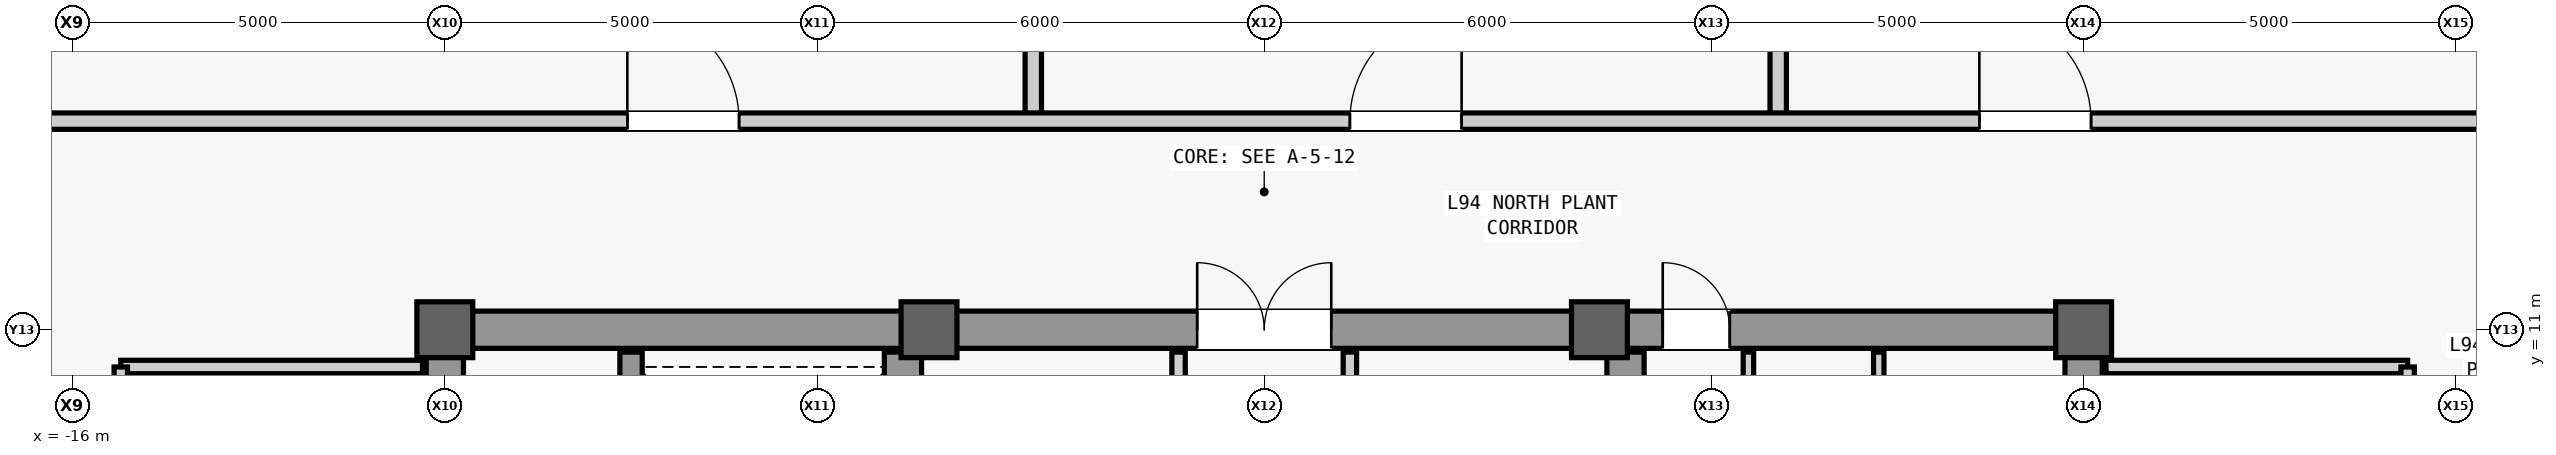
"""IFC4 building model, lengths in metres.
Left out: names, types, materials, properties, quantities, classifications, styles, units other than length and angle.
Written with IfcOpenShell. Run it as: python <this file> out.ifc"""

import sys

from ifc_helpers import new_model, si_unit, direction, frame, frame_2d, origin, origin_2d, place, context, subcontext, project, spatial, rectangle, extrude, source, transform, mapped, element, fill, save


model = new_model("IFC4")
c1 = context("Model", 3, precision=1e-05, world=origin(), true_north=direction((0.0, 1.0)))
c2 = subcontext(c1, "Body", "Model", "MODEL_VIEW")
j1 = project(units=[si_unit("LENGTHUNIT", "METRE"), si_unit("PLANEANGLEUNIT", "RADIAN")], contexts=[c1])
p1 = place(None, origin())
s1 = spatial("IfcSite", under=j1, at=p1, CompositionType="ELEMENT")
p2 = place(p1, origin())
s2 = spatial("IfcBuilding", under=s1, at=p2, CompositionType="ELEMENT")
p3 = place(p2, frame((0.0, 0.0, 399.5)))
s3 = spatial("IfcBuildingStorey", under=s2, at=p3, CompositionType="ELEMENT", Elevation=399.5)
m1 = source(origin(), c2, "Body", "SweptSolid", [
    extrude(rectangle(XDim=22.0, YDim=0.5, at=frame_2d((11.0, 0.0))), origin(), (0.0, 0.0, 1.0), 4.5),
])
p4 = place(p3, frame((-11.0, -11.0, 0.0), z_axis=(0.0, 0.0, 1.0), x_axis=(0.0, 1.0, 0.0)))
e1 = element("IfcWall", 1, at=p4, inside=s3, PredefinedType="SHEAR", context=c2, shape_type="MappedRepresentation", body=[
    mapped(m1, transform((0.0, 0.0, 0.0), scale=1.0)),
])
m2 = source(origin(), c2, "Body", "SweptSolid", [
    extrude(rectangle(XDim=1.1, YDim=2.2, at=frame_2d((0.55, 1.1))), frame((0.0, 0.26, 0.0), z_axis=(0.0, -1.0, 0.0), x_axis=(1.0, 0.0, 0.0)), (0.0, 0.0, 1.0), 0.52),
])
p5 = place(p4, frame((0.8, 0.0, 0.0)))
e2 = element("IfcOpeningElement", 2, at=p5, cuts=e1, PredefinedType="OPENING", context=c2, shape_type="MappedRepresentation", body=[
    mapped(m2, transform((0.0, 0.0, 0.0), scale=1.0)),
])
p6 = place(p4, frame((12.5, 0.0, 0.0)))
e3 = element("IfcOpeningElement", 3, at=p6, cuts=e1, PredefinedType="OPENING", context=c2, shape_type="MappedRepresentation", body=[
    mapped(m2, transform((0.0, 0.0, 0.0), scale=1.0)),
])
m3 = source(origin(), c2, "Body", "SweptSolid", [
    extrude(rectangle(XDim=0.9, YDim=2.15, at=frame_2d((0.45, 1.075))), frame((0.0, 0.26, 0.0), z_axis=(0.0, -1.0, 0.0), x_axis=(1.0, 0.0, 0.0)), (0.0, 0.0, 1.0), 0.52),
])
p7 = place(p4, frame((7.575, 0.0, 0.0)))
e4 = element("IfcOpeningElement", 4, at=p7, cuts=e1, PredefinedType="OPENING", context=c2, shape_type="MappedRepresentation", body=[
    mapped(m3, transform((0.0, 0.0, 0.0), scale=1.0)),
])
m4 = source(origin(), c2, "Body", "SweptSolid", [
    extrude(rectangle(XDim=1.3, YDim=2.3, at=frame_2d((0.65, 1.15))), frame((0.0, 0.26, 0.0), z_axis=(0.0, -1.0, 0.0), x_axis=(1.0, 0.0, 0.0)), (0.0, 0.0, 1.0), 0.52),
])
p8 = place(p4, frame((2.7, 0.0, 0.0)))
e5 = element("IfcOpeningElement", 5, at=p8, cuts=e1, PredefinedType="OPENING", context=c2, shape_type="MappedRepresentation", body=[
    mapped(m4, transform((0.0, 0.0, 0.0), scale=1.0)),
])
p9 = place(p3, frame((11.0, -11.0, 0.0), z_axis=(0.0, 0.0, 1.0), x_axis=(0.0, 1.0, 0.0)))
e6 = element("IfcWall", 6, at=p9, inside=s3, PredefinedType="SHEAR", context=c2, shape_type="MappedRepresentation", body=[
    mapped(m1, transform((0.0, 0.0, 0.0), scale=1.0)),
])
p10 = place(p9, frame((0.8, 0.0, 0.0)))
e7 = element("IfcOpeningElement", 7, at=p10, cuts=e6, PredefinedType="OPENING", context=c2, shape_type="MappedRepresentation", body=[
    mapped(m2, transform((0.0, 0.0, 0.0), scale=1.0)),
])
p11 = place(p9, frame((7.575, 0.0, 0.0)))
e8 = element("IfcOpeningElement", 8, at=p11, cuts=e6, PredefinedType="OPENING", context=c2, shape_type="MappedRepresentation", body=[
    mapped(m3, transform((0.0, 0.0, 0.0), scale=1.0)),
])
p12 = place(p9, frame((2.7, 0.0, 0.0)))
e9 = element("IfcOpeningElement", 9, at=p12, cuts=e6, PredefinedType="OPENING", context=c2, shape_type="MappedRepresentation", body=[
    mapped(m4, transform((0.0, 0.0, 0.0), scale=1.0)),
])
p13 = place(p9, frame((13.35, 0.0, 0.0)))
e10 = element("IfcOpeningElement", 10, at=p13, cuts=e6, PredefinedType="OPENING", context=c2, shape_type="MappedRepresentation", body=[
    mapped(m4, transform((0.0, 0.0, 0.0), scale=1.0)),
])
m5 = source(origin(), c2, "Body", "SweptSolid", [
    extrude(rectangle(XDim=21.4, YDim=0.5, at=frame_2d((10.7, 0.0))), origin(), (0.0, 0.0, 1.0), 4.5),
])
for number, where, z_axis, x_axis in (
    (11, (-4.85, -10.7, 0.0), (0.0, 0.0, 1.0), (0.0, 1.0, 0.0)),
    (12, (4.85, -10.7, 0.0), (0.0, 0.0, 1.0), (0.0, 1.0, 0.0)),
):
    element("IfcWall", number, at=place(p3, frame(where, z_axis=z_axis, x_axis=x_axis)), inside=s3, PredefinedType="SHEAR", context=c2, shape_type="MappedRepresentation", body=[
        mapped(m5, transform((0.0, 0.0, 0.0), scale=1.0)),
    ])
m6 = source(origin(), c2, "Body", "SweptSolid", [
    extrude(rectangle(XDim=5.9, YDim=0.5, at=frame_2d((2.95, 0.0))), origin(), (0.0, 0.0, 1.0), 4.5),
])
p14 = place(p3, frame((-10.75, 11.0, 0.0), z_axis=(0.0, 0.0, 1.0), x_axis=(1.0, 0.0, 0.0)))
e13 = element("IfcWall", 13, at=p14, inside=s3, PredefinedType="SHEAR", context=c2, shape_type="MappedRepresentation", body=[
    mapped(m6, transform((0.0, 0.0, 0.0), scale=1.0)),
])
p15 = place(p3, frame((4.85, 11.0, 0.0), z_axis=(0.0, 0.0, 1.0), x_axis=(1.0, 0.0, 0.0)))
e14 = element("IfcWall", 14, at=p15, inside=s3, PredefinedType="SHEAR", context=c2, shape_type="MappedRepresentation", body=[
    mapped(m6, transform((0.0, 0.0, 0.0), scale=1.0)),
])
p16 = place(p15, frame((0.5, 0.0, 0.0)))
e15 = element("IfcOpeningElement", 15, at=p16, cuts=e14, PredefinedType="OPENING", context=c2, shape_type="MappedRepresentation", body=[
    mapped(m3, transform((0.0, 0.0, 0.0), scale=1.0)),
])
m7 = source(origin(), c2, "Body", "SweptSolid", [
    extrude(rectangle(XDim=9.2, YDim=0.5, at=frame_2d((4.6, 0.0))), origin(), (0.0, 0.0, 1.0), 4.5),
])
p17 = place(p3, frame((-4.6, 11.0, 0.0), z_axis=(0.0, 0.0, 1.0), x_axis=(1.0, 0.0, 0.0)))
e16 = element("IfcWall", 16, at=p17, inside=s3, PredefinedType="SHEAR", context=c2, shape_type="MappedRepresentation", body=[
    mapped(m7, transform((0.0, 0.0, 0.0), scale=1.0)),
])
m8 = source(origin(), c2, "Body", "SweptSolid", [
    extrude(rectangle(XDim=1.8, YDim=2.25, at=frame_2d((0.9, 1.125))), frame((0.0, 0.26, 0.0), z_axis=(0.0, -1.0, 0.0), x_axis=(1.0, 0.0, 0.0)), (0.0, 0.0, 1.0), 0.52),
])
p18 = place(p17, frame((3.7, 0.0, 0.0)))
e17 = element("IfcOpeningElement", 17, at=p18, cuts=e16, PredefinedType="OPENING", context=c2, shape_type="MappedRepresentation", body=[
    mapped(m8, transform((0.0, 0.0, 0.0), scale=1.0)),
])
m9 = source(origin(), c2, "Body", "SweptSolid", [
    extrude(rectangle(XDim=0.75, YDim=0.75, at=origin_2d()), origin(), (0.0, 0.0, 1.0), 4.8),
])
for number, where, z_axis, x_axis in (
    (18, (-11.0, 11.0, 0.0), (0.0, 0.0, 1.0), (1.0, 0.0, 0.0)),
    (19, (-4.5, 11.0, 0.0), (0.0, 0.0, 1.0), (1.0, 0.0, 0.0)),
    (20, (4.5, 11.0, 0.0), (0.0, 0.0, 1.0), (1.0, 0.0, 0.0)),
    (21, (11.0, 11.0, 0.0), (0.0, 0.0, 1.0), (1.0, 0.0, 0.0)),
):
    element("IfcColumn", number, at=place(p3, frame(where, z_axis=z_axis, x_axis=x_axis)), inside=s3, PredefinedType="COLUMN", context=c2, shape_type="MappedRepresentation", body=[
        mapped(m9, transform((0.0, 0.0, 0.0), scale=1.0)),
    ])
m10 = source(origin(), c2, "Body", "SweptSolid", [
    extrude(rectangle(XDim=7.75, YDim=0.3, at=frame_2d((3.875, 0.0))), origin(), (0.0, 0.0, 1.0), 4.5),
])
p19 = place(p3, frame((-8.5, 2.95, 0.0), z_axis=(0.0, 0.0, 1.0), x_axis=(0.0, 1.0, 0.0)))
e22 = element("IfcWall", 22, at=p19, inside=s3, PredefinedType="SHEAR", context=c2, shape_type="MappedRepresentation", body=[
    mapped(m10, transform((0.0, 0.0, 0.0), scale=1.0)),
])
m11 = source(origin(), c2, "Body", "SweptSolid", [
    extrude(rectangle(XDim=9.4, YDim=0.14, at=frame_2d((4.7, 0.0))), origin(), (0.0, 0.0, 1.0), 4.5),
])
p20 = place(p3, frame((8.25, 1.3, 0.0), z_axis=(0.0, 0.0, 1.0), x_axis=(0.0, 1.0, 0.0)))
e23 = element("IfcWall", 23, at=p20, inside=s3, PredefinedType="PARTITIONING", context=c2, shape_type="MappedRepresentation", body=[
    mapped(m11, transform((0.0, 0.0, 0.0), scale=1.0)),
])
m12 = source(origin(), c2, "Body", "SweptSolid", [
    extrude(rectangle(XDim=5.7, YDim=0.14, at=frame_2d((2.85, 0.0))), origin(), (0.0, 0.0, 1.0), 4.5),
])
p21 = place(p3, frame((6.5, 5.0, 0.0), z_axis=(0.0, 0.0, 1.0), x_axis=(0.0, 1.0, 0.0)))
e24 = element("IfcWall", 24, at=p21, inside=s3, PredefinedType="PARTITIONING", context=c2, shape_type="MappedRepresentation", body=[
    mapped(m12, transform((0.0, 0.0, 0.0), scale=1.0)),
])
m13 = source(origin(), c2, "Body", "SweptSolid", [
    extrude(rectangle(XDim=0.9, YDim=2.15, at=frame_2d((0.45, 1.075))), frame((0.0, 0.08, 0.0), z_axis=(0.0, -1.0, 0.0), x_axis=(1.0, 0.0, 0.0)), (0.0, 0.0, 1.0), 0.16),
])
p22 = place(p21, frame((2.05, 0.0, 0.0)))
e25 = element("IfcOpeningElement", 25, at=p22, cuts=e24, PredefinedType="OPENING", context=c2, shape_type="MappedRepresentation", body=[
    mapped(m13, transform((0.0, 0.0, 0.0), scale=1.0)),
])
m14 = source(origin(), c2, "Body", "SweptSolid", [
    extrude(rectangle(XDim=4.05, YDim=0.18, at=frame_2d((2.025, 0.0))), origin(), (0.0, 0.0, 1.0), 4.5),
])
p23 = place(p3, frame((-15.35, 10.5, 0.0), z_axis=(0.0, 0.0, 1.0), x_axis=(1.0, 0.0, 0.0)))
e26 = element("IfcWall", 26, at=p23, inside=s3, PredefinedType="PARTITIONING", context=c2, shape_type="MappedRepresentation", body=[
    mapped(m14, transform((0.0, 0.0, 0.0), scale=1.0)),
])
m15 = source(origin(), c2, "Body", "SweptSolid", [
    extrude(rectangle(XDim=16.6, YDim=0.18, at=frame_2d((8.3, 0.0))), origin(), (0.0, 0.0, 1.0), 4.5),
])
p24 = place(p3, frame((-15.35, -6.1, 0.0), z_axis=(0.0, 0.0, 1.0), x_axis=(0.0, 1.0, 0.0)))
e27 = element("IfcWall", 27, at=p24, inside=s3, PredefinedType="PARTITIONING", context=c2, shape_type="MappedRepresentation", body=[
    mapped(m15, transform((0.0, 0.0, 0.0), scale=1.0)),
])
m16 = source(origin(), c2, "Body", "SweptSolid", [
    extrude(rectangle(XDim=1.8, YDim=2.25, at=frame_2d((0.9, 1.125))), frame((0.0, 0.1, 0.0), z_axis=(0.0, -1.0, 0.0), x_axis=(1.0, 0.0, 0.0)), (0.0, 0.0, 1.0), 0.2),
])
p25 = place(p24, frame((2.7, 0.0, 0.0)))
e28 = element("IfcOpeningElement", 28, at=p25, cuts=e27, PredefinedType="OPENING", context=c2, shape_type="MappedRepresentation", body=[
    mapped(m16, transform((0.0, 0.0, 0.0), scale=1.0)),
])
p26 = place(p24, frame((11.0, 0.0, 0.0)))
e29 = element("IfcOpeningElement", 29, at=p26, cuts=e27, PredefinedType="OPENING", context=c2, shape_type="MappedRepresentation", body=[
    mapped(m16, transform((0.0, 0.0, 0.0), scale=1.0)),
])
p27 = place(p3, frame((11.3, 10.5, 0.0), z_axis=(0.0, 0.0, 1.0), x_axis=(1.0, 0.0, 0.0)))
e30 = element("IfcWall", 30, at=p27, inside=s3, PredefinedType="PARTITIONING", context=c2, shape_type="MappedRepresentation", body=[
    mapped(m14, transform((0.0, 0.0, 0.0), scale=1.0)),
])
p28 = place(p3, frame((15.35, -6.1, 0.0), z_axis=(0.0, 0.0, 1.0), x_axis=(0.0, 1.0, 0.0)))
e31 = element("IfcWall", 31, at=p28, inside=s3, PredefinedType="PARTITIONING", context=c2, shape_type="MappedRepresentation", body=[
    mapped(m15, transform((0.0, 0.0, 0.0), scale=1.0)),
])
p29 = place(p28, frame((2.7, 0.0, 0.0)))
e32 = element("IfcOpeningElement", 32, at=p29, cuts=e31, PredefinedType="OPENING", context=c2, shape_type="MappedRepresentation", body=[
    mapped(m16, transform((0.0, 0.0, 0.0), scale=1.0)),
])
p30 = place(p28, frame((13.0, 0.0, 0.0)))
e33 = element("IfcOpeningElement", 33, at=p30, cuts=e31, PredefinedType="OPENING", context=c2, shape_type="MappedRepresentation", body=[
    mapped(m16, transform((0.0, 0.0, 0.0), scale=1.0)),
])
m17 = source(origin(), c2, "Body", "SweptSolid", [
    extrude(rectangle(XDim=5.4, YDim=0.18, at=frame_2d((2.7, 0.0))), origin(), (0.0, 0.0, 1.0), 4.5),
])
p31 = place(p3, frame((-1.15, 5.3, 0.0), z_axis=(0.0, 0.0, 1.0), x_axis=(0.0, 1.0, 0.0)))
e34 = element("IfcWall", 34, at=p31, inside=s3, PredefinedType="PARTITIONING", context=c2, shape_type="MappedRepresentation", body=[
    mapped(m17, transform((0.0, 0.0, 0.0), scale=1.0)),
])
m18 = source(origin(), c2, "Body", "SweptSolid", [
    extrude(rectangle(XDim=0.9, YDim=2.15, at=frame_2d((0.45, 1.075))), frame((0.0, 0.1, 0.0), z_axis=(0.0, -1.0, 0.0), x_axis=(1.0, 0.0, 0.0)), (0.0, 0.0, 1.0), 0.2),
])
p32 = place(p31, frame((0.7, 0.0, 0.0)))
e35 = element("IfcOpeningElement", 35, at=p32, cuts=e34, PredefinedType="OPENING", context=c2, shape_type="MappedRepresentation", body=[
    mapped(m18, transform((0.0, 0.0, 0.0), scale=1.0)),
])
p33 = place(p31, frame((3.4, 0.0, 0.0)))
e36 = element("IfcOpeningElement", 36, at=p33, cuts=e34, PredefinedType="OPENING", context=c2, shape_type="MappedRepresentation", body=[
    mapped(m18, transform((0.0, 0.0, 0.0), scale=1.0)),
])
p34 = place(p3, frame((1.15, 5.3, 0.0), z_axis=(0.0, 0.0, 1.0), x_axis=(0.0, 1.0, 0.0)))
e37 = element("IfcWall", 37, at=p34, inside=s3, PredefinedType="PARTITIONING", context=c2, shape_type="MappedRepresentation", body=[
    mapped(m17, transform((0.0, 0.0, 0.0), scale=1.0)),
])
p35 = place(p34, frame((0.45, 0.0, 0.0)))
e38 = element("IfcOpeningElement", 38, at=p35, cuts=e37, PredefinedType="OPENING", context=c2, shape_type="MappedRepresentation", body=[
    mapped(m18, transform((0.0, 0.0, 0.0), scale=1.0)),
])
p36 = place(p34, frame((2.25, 0.0, 0.0)))
e39 = element("IfcOpeningElement", 39, at=p36, cuts=e37, PredefinedType="OPENING", context=c2, shape_type="MappedRepresentation", body=[
    mapped(m18, transform((0.0, 0.0, 0.0), scale=1.0)),
])
p37 = place(p34, frame((4.05, 0.0, 0.0)))
e40 = element("IfcOpeningElement", 40, at=p37, cuts=e37, PredefinedType="OPENING", context=c2, shape_type="MappedRepresentation", body=[
    mapped(m18, transform((0.0, 0.0, 0.0), scale=1.0)),
])
m19 = source(origin(), c2, "Body", "SweptSolid", [
    extrude(rectangle(XDim=10.2, YDim=0.22, at=frame_2d((5.1, 0.0))), origin(), (0.0, 0.0, 1.0), 4.5),
])
for number, where, z_axis, x_axis in (
    (41, (-3.1, 13.8, 0.0), (0.0, 0.0, 1.0), (0.0, 1.0, 0.0)),
    (42, (6.9, 13.8, 0.0), (0.0, 0.0, 1.0), (0.0, 1.0, 0.0)),
):
    element("IfcWall", number, at=place(p3, frame(where, z_axis=z_axis, x_axis=x_axis)), inside=s3, PredefinedType="PARTITIONING", context=c2, shape_type="MappedRepresentation", body=[
        mapped(m19, transform((0.0, 0.0, 0.0), scale=1.0)),
    ])
m20 = source(origin(), c2, "Body", "SweptSolid", [
    extrude(rectangle(XDim=36.0, YDim=0.22, at=frame_2d((18.0, 0.0))), origin(), (0.0, 0.0, 1.0), 4.5),
])
p38 = place(p3, frame((-18.0, 13.8, 0.0), z_axis=(0.0, 0.0, 1.0), x_axis=(1.0, 0.0, 0.0)))
e43 = element("IfcWall", 43, at=p38, inside=s3, PredefinedType="PARTITIONING", context=c2, shape_type="MappedRepresentation", body=[
    mapped(m20, transform((0.0, 0.0, 0.0), scale=1.0)),
])
m21 = source(origin(), c2, "Body", "SweptSolid", [
    extrude(rectangle(XDim=1.5, YDim=2.3, at=frame_2d((0.75, 1.15))), frame((0.0, 0.12, 0.0), z_axis=(0.0, -1.0, 0.0), x_axis=(1.0, 0.0, 0.0)), (0.0, 0.0, 1.0), 0.24),
])
p39 = place(p38, frame((9.45, 0.0, 0.0)))
e44 = element("IfcOpeningElement", 44, at=p39, cuts=e43, PredefinedType="OPENING", context=c2, shape_type="MappedRepresentation", body=[
    mapped(m21, transform((0.0, 0.0, 0.0), scale=1.0)),
])
p40 = place(p38, frame((19.15, 0.0, 0.0)))
e45 = element("IfcOpeningElement", 45, at=p40, cuts=e43, PredefinedType="OPENING", context=c2, shape_type="MappedRepresentation", body=[
    mapped(m21, transform((0.0, 0.0, 0.0), scale=1.0)),
])
p41 = place(p38, frame((27.6, 0.0, 0.0)))
e46 = element("IfcOpeningElement", 46, at=p41, cuts=e43, PredefinedType="OPENING", context=c2, shape_type="MappedRepresentation", body=[
    mapped(m21, transform((0.0, 0.0, 0.0), scale=1.0)),
])
m22 = source(origin(), c2, "Body", "SweptSolid", [
    extrude(rectangle(XDim=0.9, YDim=2.15, at=frame_2d((0.45, 1.075))), frame((0.0, 0.025, 0.0), z_axis=(0.0, -1.0, 0.0), x_axis=(1.0, 0.0, 0.0)), (0.0, 0.0, 1.0), 0.05),
])
p42 = place(p16, origin())
e47 = element("IfcDoor", 47, at=p42, inside=s3, OperationType="SINGLE_SWING_LEFT", PredefinedType="DOOR", context=c2, shape_type="MappedRepresentation", body=[
    mapped(m22, transform((0.0, 0.0, 0.0), scale=1.0)),
])
fill(e15, e47)
m23 = source(origin(), c2, "Body", "SweptSolid", [
    extrude(rectangle(XDim=1.8, YDim=2.25, at=frame_2d((0.9, 1.125))), frame((0.0, 0.025, 0.0), z_axis=(0.0, -1.0, 0.0), x_axis=(1.0, 0.0, 0.0)), (0.0, 0.0, 1.0), 0.05),
])
p43 = place(p18, origin())
e48 = element("IfcDoor", 48, at=p43, inside=s3, OperationType="SINGLE_SWING_RIGHT", PredefinedType="DOOR", context=c2, shape_type="MappedRepresentation", body=[
    mapped(m23, transform((0.0, 0.0, 0.0), scale=1.0)),
])
fill(e17, e48)
m24 = source(origin(), c2, "Body", "SweptSolid", [
    extrude(rectangle(XDim=1.5, YDim=2.3, at=frame_2d((0.75, 1.15))), frame((0.0, 0.025, 0.0), z_axis=(0.0, -1.0, 0.0), x_axis=(1.0, 0.0, 0.0)), (0.0, 0.0, 1.0), 0.05),
])
p44 = place(p39, origin())
e49 = element("IfcDoor", 49, at=p44, inside=s3, OperationType="SINGLE_SWING_LEFT", PredefinedType="DOOR", context=c2, shape_type="MappedRepresentation", body=[
    mapped(m24, transform((0.0, 0.0, 0.0), scale=1.0)),
])
fill(e44, e49)
p45 = place(p40, origin())
e50 = element("IfcDoor", 50, at=p45, inside=s3, OperationType="SINGLE_SWING_RIGHT", PredefinedType="DOOR", context=c2, shape_type="MappedRepresentation", body=[
    mapped(m24, transform((0.0, 0.0, 0.0), scale=1.0)),
])
fill(e45, e50)
p46 = place(p41, origin())
e51 = element("IfcDoor", 51, at=p46, inside=s3, OperationType="SINGLE_SWING_LEFT", PredefinedType="DOOR", context=c2, shape_type="MappedRepresentation", body=[
    mapped(m24, transform((0.0, 0.0, 0.0), scale=1.0)),
])
fill(e46, e51)
save(model, sys.argv[1])
